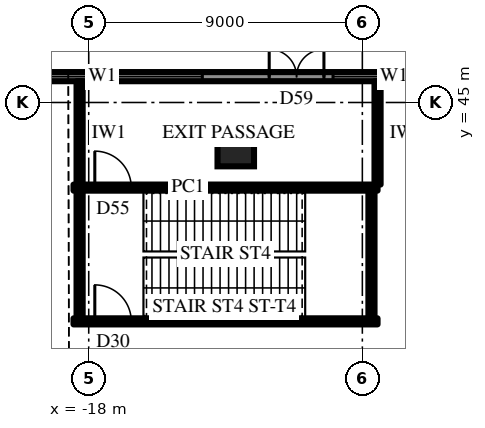
"""IFC4 building model, lengths in metres.
Left out: names, types, materials, properties, quantities, classifications, styles, units other than length and angle.
Written with IfcOpenShell. Run it as: python <this file> out.ifc"""

import sys

from ifc_helpers import new_model, si_unit, direction, frame, frame_2d, origin, origin_2d, place, context, subcontext, project, spatial, rectangle, extrude, element, fill, save


model = new_model("IFC4")
c1 = context("Model", 3, precision=1e-05, world=origin(), true_north=direction((0.0, 1.0)))
c2 = subcontext(c1, "Body", "Model", "MODEL_VIEW")
j1 = project(units=[si_unit("LENGTHUNIT", "METRE"), si_unit("PLANEANGLEUNIT", "RADIAN")], contexts=[c1])
p1 = place(None, origin())
s1 = spatial("IfcSite", under=j1, at=p1, CompositionType="ELEMENT")
p2 = place(p1, origin())
s2 = spatial("IfcBuilding", under=s1, at=p2, CompositionType="ELEMENT")
p3 = place(p2, origin())
s3 = spatial("IfcBuildingStorey", under=s2, at=p3, CompositionType="ELEMENT", Elevation=0.0)
p4 = place(p3, frame((-18.5, 37.8, 0.0), z_axis=(0.0, 0.0, 1.0), x_axis=(1.0, 0.0, 0.0)))
e1 = element("IfcWall", 1, at=p4, inside=s3, PredefinedType="SHEAR", context=c2, shape_type="SweptSolid", body=[
    extrude(rectangle(XDim=10.0, YDim=0.2, at=frame_2d((5.0, 0.0))), origin(), (0.0, 0.0, 1.0), 7.0),
])
p5 = place(p4, frame((0.7, 0.0, 0.0)))
e2 = element("IfcOpeningElement", 2, at=p5, cuts=e1, PredefinedType="OPENING", context=c2, shape_type="SweptSolid", body=[
    extrude(rectangle(XDim=1.2, YDim=2.2, at=frame_2d((0.6, 1.1))), frame((0.0, 0.11, 0.0), z_axis=(0.0, -1.0, 0.0), x_axis=(1.0, 0.0, 0.0)), (0.0, 0.0, 1.0), 0.22),
])
p6 = place(p3, frame((-8.5, 42.2, 0.0), z_axis=(0.0, 0.0, 1.0), x_axis=(-1.0, 0.0, 0.0)))
e3 = element("IfcWall", 3, at=p6, inside=s3, PredefinedType="SHEAR", context=c2, shape_type="SweptSolid", body=[
    extrude(rectangle(XDim=10.0, YDim=0.2, at=frame_2d((5.0, 0.0))), origin(), (0.0, 0.0, 1.0), 7.0),
])
p7 = place(p6, frame((8.1, 0.0, 0.0)))
e4 = element("IfcOpeningElement", 4, at=p7, cuts=e3, PredefinedType="OPENING", context=c2, shape_type="SweptSolid", body=[
    extrude(rectangle(XDim=1.2, YDim=2.2, at=frame_2d((0.6, 1.1))), frame((0.0, 0.11, 0.0), z_axis=(0.0, -1.0, 0.0), x_axis=(1.0, 0.0, 0.0)), (0.0, 0.0, 1.0), 0.22),
])
for number, where, z_axis, x_axis in (
    (5, (-18.3, 42.1, 0.0), (0.0, 0.0, 1.0), (0.0, -1.0, 0.0)),
    (6, (-8.7, 37.9, 0.0), (0.0, 0.0, 1.0), (0.0, 1.0, 0.0)),
):
    element("IfcWall", number, at=place(p3, frame(where, z_axis=z_axis, x_axis=x_axis)), inside=s3, PredefinedType="SHEAR", context=c2, shape_type="SweptSolid", body=[
        extrude(rectangle(XDim=4.2, YDim=0.2, at=frame_2d((2.1, 0.0))), origin(), (0.0, 0.0, 1.0), 7.0),
    ])
p8 = place(p3, frame((-13.164, 43.5, 0.0), z_axis=(0.0, 0.0, 1.0), x_axis=(-1.0, 0.0, 0.0)))
e7 = element("IfcColumn", 7, at=p8, inside=s3, PredefinedType="COLUMN", context=c2, shape_type="SweptSolid", body=[
    extrude(rectangle(XDim=1.2, YDim=1.2, at=origin_2d()), origin(), (0.0, 0.0, 1.0), 7.0),
])
p9 = place(p3, frame((21.939, 45.85, 0.0), z_axis=(0.0, 0.0, 1.0), x_axis=(-1.0, 0.0, 0.0)))
e8 = element("IfcWall", 8, at=p9, inside=s3, PredefinedType="SOLIDWALL", context=c2, shape_type="SweptSolid", body=[
    extrude(rectangle(XDim=43.878, YDim=0.3, at=frame_2d((21.939, 0.0))), origin(), (0.0, 0.0, 1.0), 6.65),
])
p10 = place(p9, frame((1.1, 0.0, 0.3)))
e9 = element("IfcOpeningElement", 9, at=p10, cuts=e8, PredefinedType="OPENING", context=c2, shape_type="SweptSolid", body=[
    extrude(rectangle(XDim=6.576, YDim=5.0, at=frame_2d((3.288, 2.5))), frame((0.0, 0.16, 0.0), z_axis=(0.0, -1.0, 0.0), x_axis=(1.0, 0.0, 0.0)), (0.0, 0.0, 1.0), 0.32),
])
p11 = place(p9, frame((9.875, 0.0, 0.0)))
e10 = element("IfcOpeningElement", 10, at=p11, cuts=e8, PredefinedType="OPENING", context=c2, shape_type="SweptSolid", body=[
    extrude(rectangle(XDim=1.8, YDim=2.4, at=frame_2d((0.9, 1.2))), frame((0.0, 0.16, 0.0), z_axis=(0.0, -1.0, 0.0), x_axis=(1.0, 0.0, 0.0)), (0.0, 0.0, 1.0), 0.32),
])
p12 = place(p9, frame((11.976, 0.0, 0.3)))
e11 = element("IfcOpeningElement", 11, at=p12, cuts=e8, PredefinedType="OPENING", context=c2, shape_type="SweptSolid", body=[
    extrude(rectangle(XDim=4.476, YDim=5.0, at=frame_2d((2.238, 2.5))), frame((0.0, 0.16, 0.0), z_axis=(0.0, -1.0, 0.0), x_axis=(1.0, 0.0, 0.0)), (0.0, 0.0, 1.0), 0.32),
])
p13 = place(p9, frame((20.189, 0.0, 0.0)))
e12 = element("IfcOpeningElement", 12, at=p13, cuts=e8, PredefinedType="OPENING", context=c2, shape_type="SweptSolid", body=[
    extrude(rectangle(XDim=3.5, YDim=4.5, at=frame_2d((1.75, 2.25))), frame((0.0, 0.16, 0.0), z_axis=(0.0, -1.0, 0.0), x_axis=(1.0, 0.0, 0.0)), (0.0, 0.0, 1.0), 0.32),
])
p14 = place(p9, frame((32.203, 0.0, 0.0)))
e13 = element("IfcOpeningElement", 13, at=p14, cuts=e8, PredefinedType="OPENING", context=c2, shape_type="SweptSolid", body=[
    extrude(rectangle(XDim=1.8, YDim=2.4, at=frame_2d((0.9, 1.2))), frame((0.0, 0.16, 0.0), z_axis=(0.0, -1.0, 0.0), x_axis=(1.0, 0.0, 0.0)), (0.0, 0.0, 1.0), 0.32),
])
p15 = place(p9, frame((27.427, 0.0, 0.3)))
e14 = element("IfcOpeningElement", 14, at=p15, cuts=e8, PredefinedType="OPENING", context=c2, shape_type="SweptSolid", body=[
    extrude(rectangle(XDim=4.476, YDim=5.0, at=frame_2d((2.238, 2.5))), frame((0.0, 0.16, 0.0), z_axis=(0.0, -1.0, 0.0), x_axis=(1.0, 0.0, 0.0)), (0.0, 0.0, 1.0), 0.32),
])
p16 = place(p9, frame((36.203, 0.0, 0.3)))
e15 = element("IfcOpeningElement", 15, at=p16, cuts=e8, PredefinedType="OPENING", context=c2, shape_type="SweptSolid", body=[
    extrude(rectangle(XDim=6.576, YDim=5.0, at=frame_2d((3.288, 2.5))), frame((0.0, 0.16, 0.0), z_axis=(0.0, -1.0, 0.0), x_axis=(1.0, 0.0, 0.0)), (0.0, 0.0, 1.0), 0.32),
])
for number, where, z_axis, x_axis in (
    (16, (-18.3, 45.7, 0.0), (0.0, 0.0, 1.0), (0.0, -1.0, 0.0)),
    (17, (-8.5, 45.7, 0.0), (0.0, 0.0, 1.0), (0.0, -1.0, 0.0)),
):
    element("IfcWall", number, at=place(p3, frame(where, z_axis=z_axis, x_axis=x_axis)), inside=s3, PredefinedType="PARTITIONING", context=c2, shape_type="SweptSolid", body=[
        extrude(rectangle(XDim=3.4, YDim=0.2, at=frame_2d((1.7, 0.0))), origin(), (0.0, 0.0, 1.0), 6.65),
    ])
p17 = place(p14, frame((1.8, 0.0, 0.0), z_axis=(0.0, 0.0, 1.0), x_axis=(-1.0, 0.0, 0.0)))
e18 = element("IfcDoor", 18, at=p17, inside=s3, OperationType="DOUBLE_DOOR_SINGLE_SWING", PredefinedType="DOOR", context=c2, shape_type="SweptSolid", body=[
    extrude(rectangle(XDim=1.8, YDim=2.4, at=frame_2d((0.9, 1.2))), frame((0.0, 0.025, 0.0), z_axis=(0.0, -1.0, 0.0), x_axis=(1.0, 0.0, 0.0)), (0.0, 0.0, 1.0), 0.05),
])
fill(e13, e18)
p18 = place(p15, origin())
e19 = element("IfcWindow", 19, at=p18, inside=s3, PartitioningType="SINGLE_PANEL", PredefinedType="WINDOW", context=c2, shape_type="SweptSolid", body=[
    extrude(rectangle(XDim=4.476, YDim=5.0, at=frame_2d((2.238, 2.5))), frame((0.0, 0.03, 0.0), z_axis=(0.0, -1.0, 0.0), x_axis=(1.0, 0.0, 0.0)), (0.0, 0.0, 1.0), 0.06),
])
fill(e14, e19)
p19 = place(p16, origin())
e20 = element("IfcWindow", 20, at=p19, inside=s3, PartitioningType="SINGLE_PANEL", PredefinedType="WINDOW", context=c2, shape_type="SweptSolid", body=[
    extrude(rectangle(XDim=6.576, YDim=5.0, at=frame_2d((3.288, 2.5))), frame((0.0, 0.03, 0.0), z_axis=(0.0, -1.0, 0.0), x_axis=(1.0, 0.0, 0.0)), (0.0, 0.0, 1.0), 0.06),
])
fill(e15, e20)
p20 = place(p5, origin())
e21 = element("IfcDoor", 21, at=p20, inside=s3, OperationType="SINGLE_SWING_RIGHT", PredefinedType="DOOR", context=c2, shape_type="SweptSolid", body=[
    extrude(rectangle(XDim=1.2, YDim=2.2, at=frame_2d((0.6, 1.1))), frame((0.0, 0.025, 0.0), z_axis=(0.0, -1.0, 0.0), x_axis=(1.0, 0.0, 0.0)), (0.0, 0.0, 1.0), 0.05),
])
fill(e2, e21)
p21 = place(p7, frame((1.2, 0.0, 0.0), z_axis=(0.0, 0.0, 1.0), x_axis=(-1.0, 0.0, 0.0)))
e22 = element("IfcDoor", 22, at=p21, inside=s3, OperationType="SINGLE_SWING_RIGHT", PredefinedType="DOOR", context=c2, shape_type="SweptSolid", body=[
    extrude(rectangle(XDim=1.2, YDim=2.2, at=frame_2d((0.6, 1.1))), frame((0.0, 0.025, 0.0), z_axis=(0.0, -1.0, 0.0), x_axis=(1.0, 0.0, 0.0)), (0.0, 0.0, 1.0), 0.05),
])
fill(e4, e22)
save(model, sys.argv[1])
